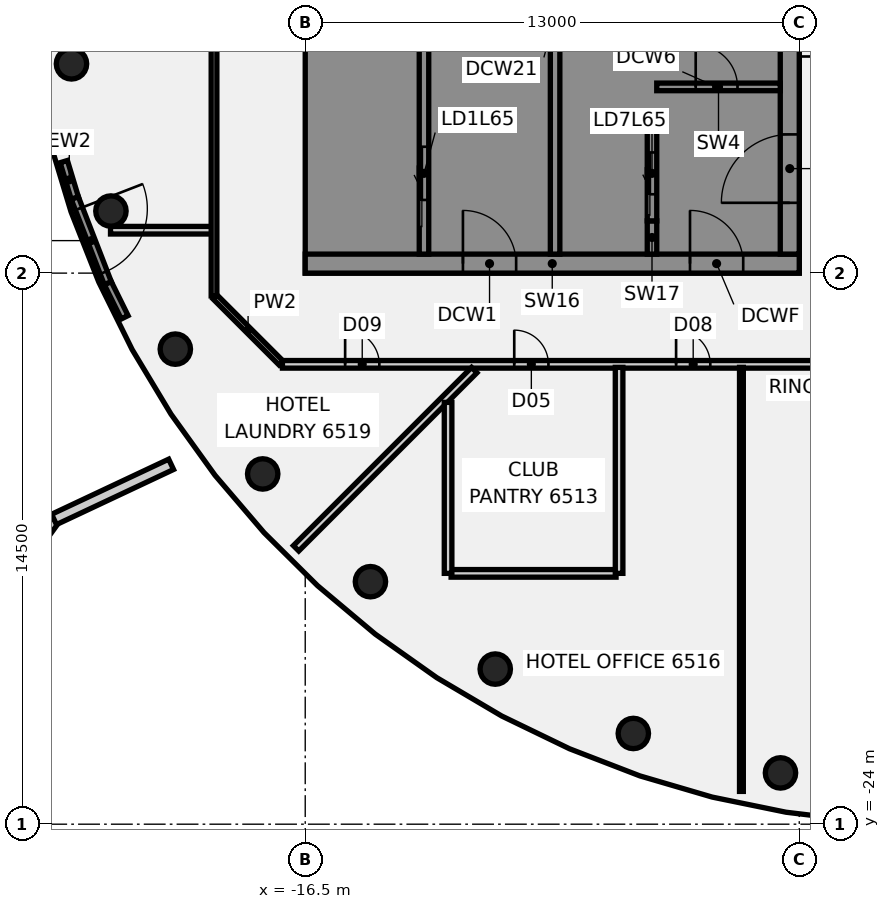
"""IFC4 building model, lengths in metres.
Left out: names, types, materials, properties, quantities, classifications, styles, units other than length and angle.
Written with IfcOpenShell. Run it as: python <this file> out.ifc"""

import sys

from ifc_helpers import new_model, si_unit, direction, frame, frame_2d, origin, origin_2d, place, context, subcontext, project, spatial, polyline, rectangle, circle, outline, extrude, element, fill, save


model = new_model("IFC4")
c1 = context("Model", 3, precision=1e-05, world=origin(), true_north=direction((0.0, 1.0)))
c2 = subcontext(c1, "Body", "Model", "MODEL_VIEW")
j1 = project(units=[si_unit("LENGTHUNIT", "METRE"), si_unit("PLANEANGLEUNIT", "RADIAN")], contexts=[c1])
p1 = place(None, origin())
s1 = spatial("IfcSite", under=j1, at=p1, CompositionType="ELEMENT")
p2 = place(p1, origin())
s2 = spatial("IfcBuilding", under=s1, at=p2, CompositionType="ELEMENT")
p3 = place(p2, frame((0.0, 0.0, 256.8)))
s3 = spatial("IfcBuildingStorey", under=s2, at=p3, CompositionType="ELEMENT", Elevation=256.8)
for number, where, z_axis, x_axis in (
    (1, (-22.651, -3.994, -0.14), (0.0, 0.0, 1.0), (1.0, 0.0, 0.0)),
    (2, (-21.613, -7.866, -0.14), (0.0, 0.0, 1.0), (1.0, 0.0, 0.0)),
    (3, (-19.919, -11.5, -0.14), (0.0, 0.0, 1.0), (1.0, 0.0, 0.0)),
    (4, (-17.619, -14.784, -0.14), (0.0, 0.0, 1.0), (1.0, 0.0, 0.0)),
    (5, (-14.784, -17.619, -0.14), (0.0, 0.0, 1.0), (1.0, 0.0, 0.0)),
    (6, (-11.5, -19.919, -0.14), (0.0, 0.0, 1.0), (1.0, 0.0, 0.0)),
    (7, (-7.866, -21.613, -0.14), (0.0, 0.0, 1.0), (1.0, 0.0, 0.0)),
    (8, (-3.994, -22.651, -0.14), (0.0, 0.0, 1.0), (1.0, 0.0, 0.0)),
):
    element("IfcColumn", number, at=place(p3, frame(where, z_axis=z_axis, x_axis=x_axis)), inside=s3, PredefinedType="COLUMN", context=c2, shape_type="SweptSolid", body=[
        extrude(circle(Radius=0.4, at=origin_2d()), origin(), (0.0, 0.0, 1.0), 3.6),
    ])
p4 = place(p3, frame((-18.872, -10.128, 0.0), z_axis=(0.0, 0.0, 1.0), x_axis=(0.707106781187, -0.707106781187, 0.0)))
e9 = element("IfcWall", 9, at=p4, inside=s3, PredefinedType="PARTITIONING", context=c2, shape_type="SweptSolid", body=[
    extrude(rectangle(XDim=2.455, YDim=0.15, at=frame_2d((1.228, 0.0))), origin(), (0.0, 0.0, 1.0), 2.864),
])
p5 = place(p3, frame((-21.624, -8.371, 0.0), z_axis=(0.0, 0.0, 1.0), x_axis=(1.0, 0.0, 0.0)))
e10 = element("IfcWall", 10, at=p5, inside=s3, PredefinedType="PARTITIONING", context=c2, shape_type="SweptSolid", body=[
    extrude(rectangle(XDim=2.669, YDim=0.2, at=frame_2d((1.334, 0.0))), origin(), (0.0, 0.0, 1.0), 2.864),
])
p6 = place(p3, frame((-17.1, -11.9, 0.0), z_axis=(0.0, 0.0, 1.0), x_axis=(1.0, 0.0, 0.0)))
e11 = element("IfcWall", 11, at=p6, inside=s3, PredefinedType="PARTITIONING", context=c2, shape_type="SweptSolid", body=[
    extrude(rectangle(XDim=34.165, YDim=0.2, at=frame_2d((17.083, 0.0))), origin(), (0.0, 0.0, 1.0), 2.864),
])
p7 = place(p6, frame((6.1, 0.0, 0.0)))
e12 = element("IfcOpeningElement", 12, at=p7, cuts=e11, PredefinedType="OPENING", context=c2, shape_type="SweptSolid", body=[
    extrude(rectangle(XDim=0.9, YDim=2.1, at=frame_2d((0.45, 1.05))), frame((0.0, 0.11, 0.0), z_axis=(0.0, -1.0, 0.0), x_axis=(1.0, 0.0, 0.0)), (0.0, 0.0, 1.0), 0.22),
])
p8 = place(p6, frame((26.541, 0.0, 0.0)))
e13 = element("IfcOpeningElement", 13, at=p8, cuts=e11, PredefinedType="OPENING", context=c2, shape_type="SweptSolid", body=[
    extrude(rectangle(XDim=1.8, YDim=2.1, at=frame_2d((0.9, 1.05))), frame((0.0, 0.11, 0.0), z_axis=(0.0, -1.0, 0.0), x_axis=(1.0, 0.0, 0.0)), (0.0, 0.0, 1.0), 0.22),
])
p9 = place(p6, frame((17.778, 0.0, 0.0)))
e14 = element("IfcOpeningElement", 14, at=p9, cuts=e11, PredefinedType="OPENING", context=c2, shape_type="SweptSolid", body=[
    extrude(rectangle(XDim=1.8, YDim=2.1, at=frame_2d((0.9, 1.05))), frame((0.0, 0.11, 0.0), z_axis=(0.0, -1.0, 0.0), x_axis=(1.0, 0.0, 0.0)), (0.0, 0.0, 1.0), 0.22),
])
p10 = place(p6, frame((10.359, 0.0, 0.0)))
e15 = element("IfcOpeningElement", 15, at=p10, cuts=e11, PredefinedType="OPENING", context=c2, shape_type="SweptSolid", body=[
    extrude(rectangle(XDim=0.9, YDim=2.1, at=frame_2d((0.45, 1.05))), frame((0.0, 0.11, 0.0), z_axis=(0.0, -1.0, 0.0), x_axis=(1.0, 0.0, 0.0)), (0.0, 0.0, 1.0), 0.22),
])
p11 = place(p6, frame((1.65, 0.0, 0.0)))
e16 = element("IfcOpeningElement", 16, at=p11, cuts=e11, PredefinedType="OPENING", context=c2, shape_type="SweptSolid", body=[
    extrude(rectangle(XDim=0.9, YDim=2.1, at=frame_2d((0.45, 1.05))), frame((0.0, 0.11, 0.0), z_axis=(0.0, -1.0, 0.0), x_axis=(1.0, 0.0, 0.0)), (0.0, 0.0, 1.0), 0.22),
])
p12 = place(p3, frame((-12.661, -17.4, 0.0), z_axis=(0.0, 0.0, 1.0), x_axis=(1.0, 0.0, 0.0)))
e17 = element("IfcWall", 17, at=p12, inside=s3, PredefinedType="PARTITIONING", context=c2, shape_type="SweptSolid", body=[
    extrude(rectangle(XDim=4.34, YDim=0.2, at=frame_2d((2.17, 0.0))), origin(), (0.0, 0.0, 1.0), 2.864),
])
p13 = place(p3, frame((-16.74, -16.74, 0.0), z_axis=(0.0, 0.0, 1.0), x_axis=(0.707106781187, 0.707106781187, 0.0)))
e18 = element("IfcWall", 18, at=p13, inside=s3, PredefinedType="PARTITIONING", context=c2, shape_type="SweptSolid", body=[
    extrude(rectangle(XDim=6.631, YDim=0.2, at=frame_2d((3.315, 0.0))), origin(), (0.0, 0.0, 1.0), 2.864),
])
p14 = place(p3, frame((-18.9, -10.1, 0.0), z_axis=(0.0, 0.0, 1.0), x_axis=(0.0, 1.0, 0.0)))
e19 = element("IfcWall", 19, at=p14, inside=s3, PredefinedType="PARTITIONING", context=c2, shape_type="SweptSolid", body=[
    extrude(rectangle(XDim=15.116, YDim=0.15, at=frame_2d((7.558, 0.0))), origin(), (0.0, 0.0, 1.0), 2.864),
])
p15 = place(p14, frame((7.729, 0.0, 0.0)))
e20 = element("IfcOpeningElement", 20, at=p15, cuts=e19, PredefinedType="OPENING", context=c2, shape_type="SweptSolid", body=[
    extrude(rectangle(XDim=0.9, YDim=2.1, at=frame_2d((0.45, 1.05))), frame((0.0, 0.085, 0.0), z_axis=(0.0, -1.0, 0.0), x_axis=(1.0, 0.0, 0.0)), (0.0, 0.0, 1.0), 0.17),
])
p16 = place(p14, frame((14.166, 0.0, 0.0)))
e21 = element("IfcOpeningElement", 21, at=p16, cuts=e19, PredefinedType="OPENING", context=c2, shape_type="SweptSolid", body=[
    extrude(rectangle(XDim=0.9, YDim=2.1, at=frame_2d((0.45, 1.05))), frame((0.0, 0.085, 0.0), z_axis=(0.0, -1.0, 0.0), x_axis=(1.0, 0.0, 0.0)), (0.0, 0.0, 1.0), 0.17),
])
p17 = place(p3, frame((-12.741, -17.4, 0.0), z_axis=(0.0, 0.0, 1.0), x_axis=(0.0, 1.0, 0.0)))
e22 = element("IfcWall", 22, at=p17, inside=s3, PredefinedType="PARTITIONING", context=c2, shape_type="SweptSolid", body=[
    extrude(rectangle(XDim=4.499, YDim=0.2, at=frame_2d((2.25, 0.0))), origin(), (0.0, 0.0, 1.0), 2.864),
])
p18 = place(p3, frame((-8.241, -17.4, 0.0), z_axis=(0.0, 0.0, 1.0), x_axis=(0.0, 1.0, 0.0)))
e23 = element("IfcWall", 23, at=p18, inside=s3, PredefinedType="PARTITIONING", context=c2, shape_type="SweptSolid", body=[
    extrude(rectangle(XDim=5.42, YDim=0.2, at=frame_2d((2.71, 0.0))), origin(), (0.0, 0.0, 1.0), 2.864),
])
p19 = place(p3, frame((-5.022, -23.137, 0.0), z_axis=(0.0, 0.0, 1.0), x_axis=(0.0, 1.0, 0.0)))
e24 = element("IfcWall", 24, at=p19, inside=s3, PredefinedType="PARTITIONING", context=c2, shape_type="SweptSolid", body=[
    extrude(rectangle(XDim=11.157, YDim=0.1, at=frame_2d((5.579, 0.0))), origin(), (0.0, 0.0, 1.0), 2.864),
])
for number, where, z_axis, x_axis in (
    (25, (-22.854, -6.565, 0.0), (0.0, 0.0, 1.0), (0.289, -0.957, 0.0)),
    (26, (-21.696, -9.762, 0.0), (0.0, 0.0, 1.0), (0.443, -0.897, 0.0)),
):
    element("IfcWall", number, at=place(p3, frame(where, z_axis=z_axis, x_axis=x_axis)), inside=s3, PredefinedType="SOLIDWALL", context=c2, shape_type="SweptSolid", body=[
        extrude(rectangle(XDim=1.004, YDim=0.2, at=frame_2d((0.502, 0.0))), origin(), (0.0, 0.0, 1.0), 3.46),
    ])
p20 = place(p3, frame((-22.563, -7.526, 0.0), z_axis=(0.0, 0.0, 1.0), x_axis=(0.361542300479, -0.932355707316, 0.0)))
e27 = element("IfcWall", 27, at=p20, inside=s3, PredefinedType="SOLIDWALL", context=c2, shape_type="SweptSolid", body=[
    extrude(rectangle(XDim=2.399, YDim=0.2, at=frame_2d((1.199, 0.0))), origin(), (0.0, 0.0, 1.0), 3.46),
])
p21 = place(p20, frame((0.3, 0.0, 0.0)))
e28 = element("IfcOpeningElement", 28, at=p21, cuts=e27, PredefinedType="OPENING", context=c2, shape_type="SweptSolid", body=[
    extrude(rectangle(XDim=1.8, YDim=2.4, at=frame_2d((0.9, 1.2))), frame((0.0, 0.11, 0.0), z_axis=(0.0, -1.0, 0.0), x_axis=(1.0, 0.0, 0.0)), (0.0, 0.0, 1.0), 0.22),
])
p22 = place(p3, frame((-24.851, -18.388, 0.0), z_axis=(0.0, 0.0, 1.0), x_axis=(0.586039444662, 0.810282524371, 0.0)))
e29 = element("IfcWall", 29, at=p22, inside=s3, PredefinedType="PARAPET", context=c2, shape_type="SweptSolid", body=[
    extrude(rectangle(XDim=2.971, YDim=0.3, at=frame_2d((1.486, 0.0))), origin(), (0.0, 0.0, 1.0), 1.1),
])
p23 = place(p3, frame((-23.11, -15.981, 0.0), z_axis=(0.0, 0.0, 1.0), x_axis=(0.904843078225, 0.42574523343, 0.0)))
e30 = element("IfcWall", 30, at=p23, inside=s3, PredefinedType="PARAPET", context=c2, shape_type="SweptSolid", body=[
    extrude(rectangle(XDim=3.405, YDim=0.3, at=frame_2d((1.702, 0.0))), origin(), (0.0, 0.0, 1.0), 1.1),
])
p24 = place(p3, frame((-16.5, -9.25, 0.0), z_axis=(0.0, 0.0, 1.0), x_axis=(1.0, 0.0, 0.0)))
e31 = element("IfcWall", 31, at=p24, inside=s3, PredefinedType="SHEAR", context=c2, shape_type="SweptSolid", body=[
    extrude(rectangle(XDim=13.0, YDim=0.5, at=frame_2d((6.5, 0.0))), origin(), (0.0, 0.0, 1.0), 3.46),
])
p25 = place(p24, frame((4.15, 0.0, 0.0)))
e32 = element("IfcOpeningElement", 32, at=p25, cuts=e31, PredefinedType="OPENING", context=c2, shape_type="SweptSolid", body=[
    extrude(rectangle(XDim=1.4, YDim=2.1, at=frame_2d((0.7, 1.05))), frame((0.0, 0.26, 0.0), z_axis=(0.0, -1.0, 0.0), x_axis=(1.0, 0.0, 0.0)), (0.0, 0.0, 1.0), 0.52),
])
p26 = place(p24, frame((10.125, 0.0, 0.0)))
e33 = element("IfcOpeningElement", 33, at=p26, cuts=e31, PredefinedType="OPENING", context=c2, shape_type="SweptSolid", body=[
    extrude(rectangle(XDim=1.4, YDim=2.1, at=frame_2d((0.7, 1.05))), frame((0.0, 0.26, 0.0), z_axis=(0.0, -1.0, 0.0), x_axis=(1.0, 0.0, 0.0)), (0.0, 0.0, 1.0), 0.52),
])
p27 = place(p3, origin())
e34 = element("IfcWall", 34, at=p27, inside=s3, PredefinedType="SHEAR", context=c2, shape_type="SweptSolid", body=[
    extrude(outline(polyline([(-13.5, -8.125), (-16.0, -8.125), (-16.0, -5.625), (-13.5, -5.625), (-13.5, -5.375), (-16.0, -5.375), (-16.0, 5.375), (-13.5, 5.375), (-13.5, 5.625), (-16.0, 5.625), (-16.0, 8.125), (-13.5, 8.125), (-13.5, 9.0), (-16.0, 9.0), (-16.5, 9.0), (-16.5, -9.0), (-16.0, -9.0), (-13.5, -9.0), (-13.5, -8.125)])), origin(), (0.0, 0.0, 1.0), 3.46),
])
p28 = place(p3, origin())
e35 = element("IfcWall", 35, at=p28, inside=s3, PredefinedType="SHEAR", context=c2, shape_type="SweptSolid", body=[
    extrude(outline(polyline([(-9.8, -5.375), (-9.8, -5.625), (-7.5, -5.625), (-7.25, -5.625), (-7.25, 9.0), (-7.5, 9.0), (-9.8, 9.0), (-9.8, 8.125), (-7.5, 8.125), (-7.5, 5.625), (-9.8, 5.625), (-9.8, 5.375), (-7.5, 5.375), (-7.5, 2.875), (-9.8, 2.875), (-9.8, 2.625), (-7.5, 2.625), (-7.5, -5.375), (-9.8, -5.375)])), origin(), (0.0, 0.0, 1.0), 3.46),
])
p29 = place(p3, origin())
e36 = element("IfcWall", 36, at=p29, inside=s3, PredefinedType="SHEAR", context=c2, shape_type="SweptSolid", body=[
    extrude(outline(polyline([(-7.5, -8.125), (-9.55, -8.125), (-9.55, -5.625), (-9.8, -5.625), (-9.8, -8.125), (-9.8, -9.0), (-7.5, -9.0), (-7.5, -8.125)])), origin(), (0.0, 0.0, 1.0), 3.46),
])
p30 = place(p3, frame((-7.375, -9.0, 0.0), z_axis=(0.0, 0.0, 1.0), x_axis=(0.0, 1.0, 0.0)))
e37 = element("IfcWall", 37, at=p30, inside=s3, PredefinedType="SHEAR", context=c2, shape_type="SweptSolid", body=[
    extrude(rectangle(XDim=0.875, YDim=0.25, at=frame_2d((0.438, 0.0))), origin(), (0.0, 0.0, 1.0), 3.46),
])
p31 = place(p3, frame((-13.375, -9.0, 0.0), z_axis=(0.0, 0.0, 1.0), x_axis=(0.0, 1.0, 0.0)))
e38 = element("IfcWall", 38, at=p31, inside=s3, PredefinedType="SHEAR", context=c2, shape_type="SweptSolid", body=[
    extrude(rectangle(XDim=18.0, YDim=0.25, at=frame_2d((9.0, 0.0))), origin(), (0.0, 0.0, 1.0), 3.46),
])
p32 = place(p31, frame((1.425, 0.0, 0.0)))
e39 = element("IfcOpeningElement", 39, at=p32, cuts=e38, PredefinedType="OPENING", context=c2, shape_type="SweptSolid", body=[
    extrude(rectangle(XDim=1.4, YDim=2.1, at=frame_2d((0.7, 1.05))), frame((0.0, 0.135, 0.0), z_axis=(0.0, -1.0, 0.0), x_axis=(1.0, 0.0, 0.0)), (0.0, 0.0, 1.0), 0.27),
])
p33 = place(p31, frame((6.646, 0.0, 0.0)))
e40 = element("IfcOpeningElement", 40, at=p33, cuts=e38, PredefinedType="OPENING", context=c2, shape_type="SweptSolid", body=[
    extrude(rectangle(XDim=1.0, YDim=2.1, at=frame_2d((0.5, 1.05))), frame((0.0, 0.135, 0.0), z_axis=(0.0, -1.0, 0.0), x_axis=(1.0, 0.0, 0.0)), (0.0, 0.0, 1.0), 0.27),
])
p34 = place(p31, frame((12.146, 0.0, 0.0)))
e41 = element("IfcOpeningElement", 41, at=p34, cuts=e38, PredefinedType="OPENING", context=c2, shape_type="SweptSolid", body=[
    extrude(rectangle(XDim=1.0, YDim=2.1, at=frame_2d((0.5, 1.05))), frame((0.0, 0.135, 0.0), z_axis=(0.0, -1.0, 0.0), x_axis=(1.0, 0.0, 0.0)), (0.0, 0.0, 1.0), 0.27),
])
p35 = place(p3, frame((-9.925, -9.0, 0.0), z_axis=(0.0, 0.0, 1.0), x_axis=(0.0, 1.0, 0.0)))
e42 = element("IfcWall", 42, at=p35, inside=s3, PredefinedType="SHEAR", context=c2, shape_type="SweptSolid", body=[
    extrude(rectangle(XDim=18.0, YDim=0.25, at=frame_2d((9.0, 0.0))), origin(), (0.0, 0.0, 1.0), 3.46),
])
p36 = place(p35, frame((12.575, 0.0, 0.0)))
e43 = element("IfcOpeningElement", 43, at=p36, cuts=e42, PredefinedType="OPENING", context=c2, shape_type="SweptSolid", body=[
    extrude(rectangle(XDim=1.1, YDim=2.1, at=frame_2d((0.55, 1.05))), frame((0.0, 0.135, 0.0), z_axis=(0.0, -1.0, 0.0), x_axis=(1.0, 0.0, 0.0)), (0.0, 0.0, 1.0), 0.27),
])
p37 = place(p35, frame((15.325, 0.0, 0.0)))
e44 = element("IfcOpeningElement", 44, at=p37, cuts=e42, PredefinedType="OPENING", context=c2, shape_type="SweptSolid", body=[
    extrude(rectangle(XDim=1.1, YDim=2.1, at=frame_2d((0.55, 1.05))), frame((0.0, 0.135, 0.0), z_axis=(0.0, -1.0, 0.0), x_axis=(1.0, 0.0, 0.0)), (0.0, 0.0, 1.0), 0.27),
])
p38 = place(p35, frame((5.75, 0.0, 0.0)))
e45 = element("IfcOpeningElement", 45, at=p38, cuts=e42, PredefinedType="OPENING", context=c2, shape_type="SweptSolid", body=[
    extrude(rectangle(XDim=1.0, YDim=2.1, at=frame_2d((0.5, 1.05))), frame((0.0, 0.135, 0.0), z_axis=(0.0, -1.0, 0.0), x_axis=(1.0, 0.0, 0.0)), (0.0, 0.0, 1.0), 0.27),
])
p39 = place(p35, frame((9.875, 0.0, 0.0)))
e46 = element("IfcOpeningElement", 46, at=p39, cuts=e42, PredefinedType="OPENING", context=c2, shape_type="SweptSolid", body=[
    extrude(rectangle(XDim=1.0, YDim=2.1, at=frame_2d((0.5, 1.05))), frame((0.0, 0.135, 0.0), z_axis=(0.0, -1.0, 0.0), x_axis=(1.0, 0.0, 0.0)), (0.0, 0.0, 1.0), 0.27),
])
p40 = place(p3, frame((-7.375, -8.125, 0.0), z_axis=(0.0, 0.0, 1.0), x_axis=(0.0, 1.0, 0.0)))
e47 = element("IfcWall", 47, at=p40, inside=s3, PredefinedType="SHEAR", context=c2, shape_type="SweptSolid", body=[
    extrude(rectangle(XDim=2.5, YDim=0.25, at=frame_2d((1.25, 0.0))), origin(), (0.0, 0.0, 1.0), 3.46),
])
p41 = place(p40, frame((0.7, 0.0, 0.0)))
e48 = element("IfcOpeningElement", 48, at=p41, cuts=e47, PredefinedType="OPENING", context=c2, shape_type="SweptSolid", body=[
    extrude(rectangle(XDim=1.1, YDim=2.1, at=frame_2d((0.55, 1.05))), frame((0.0, 0.135, 0.0), z_axis=(0.0, -1.0, 0.0), x_axis=(1.0, 0.0, 0.0)), (0.0, 0.0, 1.0), 0.27),
])
p42 = place(p3, frame((-3.75, -9.0, 0.0), z_axis=(0.0, 0.0, 1.0), x_axis=(0.0, 1.0, 0.0)))
e49 = element("IfcWall", 49, at=p42, inside=s3, PredefinedType="SHEAR", context=c2, shape_type="SweptSolid", body=[
    extrude(rectangle(XDim=18.0, YDim=0.5, at=frame_2d((9.0, 0.0))), origin(), (0.0, 0.0, 1.0), 3.46),
])
p43 = place(p42, frame((1.35, 0.0, 0.0)))
e50 = element("IfcOpeningElement", 50, at=p43, cuts=e49, PredefinedType="OPENING", context=c2, shape_type="SweptSolid", body=[
    extrude(rectangle(XDim=1.8, YDim=2.1, at=frame_2d((0.9, 1.05))), frame((0.0, 0.26, 0.0), z_axis=(0.0, -1.0, 0.0), x_axis=(1.0, 0.0, 0.0)), (0.0, 0.0, 1.0), 0.52),
])
p44 = place(p42, frame((12.478, 0.0, 0.0)))
e51 = element("IfcOpeningElement", 51, at=p44, cuts=e49, PredefinedType="OPENING", context=c2, shape_type="SweptSolid", body=[
    extrude(rectangle(XDim=1.0, YDim=2.1, at=frame_2d((0.5, 1.05))), frame((0.0, 0.26, 0.0), z_axis=(0.0, -1.0, 0.0), x_axis=(1.0, 0.0, 0.0)), (0.0, 0.0, 1.0), 0.52),
])
p45 = place(p42, frame((16.002, 0.0, 0.0)))
e52 = element("IfcOpeningElement", 52, at=p45, cuts=e49, PredefinedType="OPENING", context=c2, shape_type="SweptSolid", body=[
    extrude(rectangle(XDim=1.0, YDim=2.1, at=frame_2d((0.5, 1.05))), frame((0.0, 0.26, 0.0), z_axis=(0.0, -1.0, 0.0), x_axis=(1.0, 0.0, 0.0)), (0.0, 0.0, 1.0), 0.52),
])
p46 = place(p3, frame((-7.25, -4.6, 0.0), z_axis=(0.0, 0.0, 1.0), x_axis=(1.0, 0.0, 0.0)))
e53 = element("IfcWall", 53, at=p46, inside=s3, PredefinedType="SHEAR", context=c2, shape_type="SweptSolid", body=[
    extrude(rectangle(XDim=3.25, YDim=0.2, at=frame_2d((1.625, 0.0))), origin(), (0.0, 0.0, 1.0), 3.46),
])
p47 = place(p46, frame((1.025, 0.0, 0.0)))
e54 = element("IfcOpeningElement", 54, at=p47, cuts=e53, PredefinedType="OPENING", context=c2, shape_type="SweptSolid", body=[
    extrude(rectangle(XDim=1.1, YDim=2.1, at=frame_2d((0.55, 1.05))), frame((0.0, 0.11, 0.0), z_axis=(0.0, -1.0, 0.0), x_axis=(1.0, 0.0, 0.0)), (0.0, 0.0, 1.0), 0.22),
])
p48 = place(p7, frame((0.9, 0.0, 0.0), z_axis=(0.0, 0.0, 1.0), x_axis=(-1.0, 0.0, 0.0)))
e55 = element("IfcDoor", 55, at=p48, inside=s3, OperationType="SINGLE_SWING_LEFT", PredefinedType="DOOR", context=c2, shape_type="SweptSolid", body=[
    extrude(rectangle(XDim=0.9, YDim=2.1, at=frame_2d((0.45, 1.05))), frame((0.0, 0.025, 0.0), z_axis=(0.0, -1.0, 0.0), x_axis=(1.0, 0.0, 0.0)), (0.0, 0.0, 1.0), 0.05),
])
fill(e12, e55)
p49 = place(p10, frame((0.9, 0.0, 0.0), z_axis=(0.0, 0.0, 1.0), x_axis=(-1.0, 0.0, 0.0)))
e56 = element("IfcDoor", 56, at=p49, inside=s3, OperationType="SINGLE_SWING_LEFT", PredefinedType="DOOR", context=c2, shape_type="SweptSolid", body=[
    extrude(rectangle(XDim=0.9, YDim=2.1, at=frame_2d((0.45, 1.05))), frame((0.0, 0.025, 0.0), z_axis=(0.0, -1.0, 0.0), x_axis=(1.0, 0.0, 0.0)), (0.0, 0.0, 1.0), 0.05),
])
fill(e15, e56)
p50 = place(p11, frame((0.9, 0.0, 0.0), z_axis=(0.0, 0.0, 1.0), x_axis=(-1.0, 0.0, 0.0)))
e57 = element("IfcDoor", 57, at=p50, inside=s3, OperationType="SINGLE_SWING_LEFT", PredefinedType="DOOR", context=c2, shape_type="SweptSolid", body=[
    extrude(rectangle(XDim=0.9, YDim=2.1, at=frame_2d((0.45, 1.05))), frame((0.0, 0.025, 0.0), z_axis=(0.0, -1.0, 0.0), x_axis=(1.0, 0.0, 0.0)), (0.0, 0.0, 1.0), 0.05),
])
fill(e16, e57)
p51 = place(p21, frame((1.8, 0.0, 0.0), z_axis=(0.0, 0.0, 1.0), x_axis=(-1.0, 0.0, 0.0)))
e58 = element("IfcDoor", 58, at=p51, inside=s3, OperationType="SINGLE_SWING_LEFT", PredefinedType="DOOR", context=c2, shape_type="SweptSolid", body=[
    extrude(rectangle(XDim=1.8, YDim=2.4, at=frame_2d((0.9, 1.2))), frame((0.0, 0.025, 0.0), z_axis=(0.0, -1.0, 0.0), x_axis=(1.0, 0.0, 0.0)), (0.0, 0.0, 1.0), 0.05),
])
fill(e28, e58)
p52 = place(p25, origin())
e59 = element("IfcDoor", 59, at=p52, inside=s3, OperationType="SINGLE_SWING_LEFT", PredefinedType="DOOR", context=c2, shape_type="SweptSolid", body=[
    extrude(rectangle(XDim=1.4, YDim=2.1, at=frame_2d((0.7, 1.05))), frame((0.0, 0.025, 0.0), z_axis=(0.0, -1.0, 0.0), x_axis=(1.0, 0.0, 0.0)), (0.0, 0.0, 1.0), 0.05),
])
fill(e32, e59)
p53 = place(p26, origin())
e60 = element("IfcDoor", 60, at=p53, inside=s3, OperationType="SINGLE_SWING_LEFT", PredefinedType="DOOR", context=c2, shape_type="SweptSolid", body=[
    extrude(rectangle(XDim=1.4, YDim=2.1, at=frame_2d((0.7, 1.05))), frame((0.0, 0.025, 0.0), z_axis=(0.0, -1.0, 0.0), x_axis=(1.0, 0.0, 0.0)), (0.0, 0.0, 1.0), 0.05),
])
fill(e33, e60)
p54 = place(p43, origin())
e61 = element("IfcDoor", 61, at=p54, inside=s3, OperationType="SINGLE_SWING_LEFT", PredefinedType="DOOR", context=c2, shape_type="SweptSolid", body=[
    extrude(rectangle(XDim=1.8, YDim=2.1, at=frame_2d((0.9, 1.05))), frame((0.0, 0.025, 0.0), z_axis=(0.0, -1.0, 0.0), x_axis=(1.0, 0.0, 0.0)), (0.0, 0.0, 1.0), 0.05),
])
fill(e50, e61)
p55 = place(p47, origin())
e62 = element("IfcDoor", 62, at=p55, inside=s3, OperationType="SINGLE_SWING_LEFT", PredefinedType="DOOR", context=c2, shape_type="SweptSolid", body=[
    extrude(rectangle(XDim=1.1, YDim=2.1, at=frame_2d((0.55, 1.05))), frame((0.0, 0.025, 0.0), z_axis=(0.0, -1.0, 0.0), x_axis=(1.0, 0.0, 0.0)), (0.0, 0.0, 1.0), 0.05),
])
fill(e54, e62)
p56 = place(p32, origin())
e63 = element("IfcDoor", 63, at=p56, inside=s3, OperationType="SLIDING_TO_LEFT", PredefinedType="DOOR", context=c2, shape_type="SweptSolid", body=[
    extrude(rectangle(XDim=1.4, YDim=2.1, at=frame_2d((0.7, 1.05))), frame((0.0, 0.025, 0.0), z_axis=(0.0, -1.0, 0.0), x_axis=(1.0, 0.0, 0.0)), (0.0, 0.0, 1.0), 0.05),
])
fill(e39, e63)
p57 = place(p41, origin())
e64 = element("IfcDoor", 64, at=p57, inside=s3, OperationType="SLIDING_TO_LEFT", PredefinedType="DOOR", context=c2, shape_type="SweptSolid", body=[
    extrude(rectangle(XDim=1.1, YDim=2.1, at=frame_2d((0.55, 1.05))), frame((0.0, 0.025, 0.0), z_axis=(0.0, -1.0, 0.0), x_axis=(1.0, 0.0, 0.0)), (0.0, 0.0, 1.0), 0.05),
])
fill(e48, e64)
save(model, sys.argv[1])
